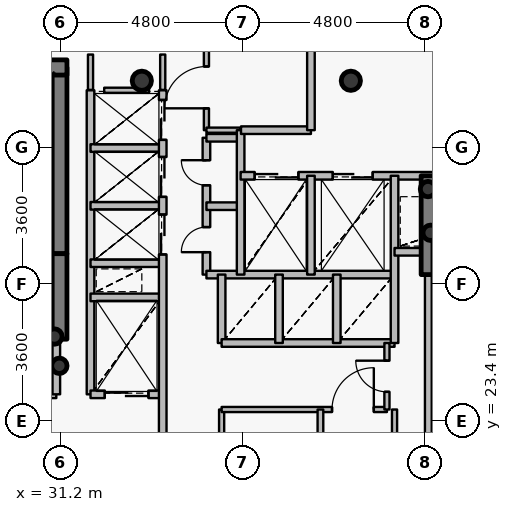
"""IFC4 building model, lengths in metres.
Left out: names, types, materials, properties, quantities, classifications, styles, units other than length and angle.
Written with IfcOpenShell. Run it as: python <this file> out.ifc"""

import sys

from ifc_helpers import new_model, si_unit, direction, frame, frame_2d, origin, origin_2d, place, context, subcontext, project, spatial, rectangle, hollow_circle, extrude, source, transform, mapped, element, fill, save


model = new_model("IFC4")
c1 = context("Model", 3, precision=1e-05, world=origin(), true_north=direction((0.0, 1.0)))
c2 = subcontext(c1, "Body", "Model", "MODEL_VIEW")
j1 = project(units=[si_unit("LENGTHUNIT", "METRE"), si_unit("PLANEANGLEUNIT", "RADIAN")], contexts=[c1])
p1 = place(None, origin())
s1 = spatial("IfcSite", under=j1, at=p1, CompositionType="ELEMENT")
p2 = place(p1, origin())
s2 = spatial("IfcBuilding", under=s1, at=p2, CompositionType="ELEMENT")
p3 = place(p2, frame((0.0, 0.0, 259.05)))
s3 = spatial("IfcBuildingStorey", under=s2, at=p3, CompositionType="ELEMENT", Elevation=259.05)
for number, where, z_axis, x_axis in (
    (1, (38.85, 32.35, 0.0), (0.0, 0.0, 1.0), (1.0, 0.0, 0.0)),
    (2, (33.35, 32.35, 0.0), (0.0, 0.0, 1.0), (1.0, 0.0, 0.0)),
):
    element("IfcColumn", number, at=place(p3, frame(where, z_axis=z_axis, x_axis=x_axis)), inside=s3, PredefinedType="COLUMN", context=c2, shape_type="SweptSolid", body=[
        extrude(hollow_circle(Radius=0.254, WallThickness=0.02, at=origin_2d()), origin(), (0.0, 0.0, 1.0), 3.75),
    ])
p4 = place(p3, frame((31.18, 27.8, 0.0), z_axis=(0.0, 0.0, 1.0), x_axis=(0.0, 1.0, 0.0)))
e3 = element("IfcWall", 3, at=p4, inside=s3, PredefinedType="SHEAR", context=c2, shape_type="SweptSolid", body=[
    extrude(rectangle(XDim=4.9, YDim=0.4, at=frame_2d((2.45, 0.0))), origin(), (0.0, 0.0, 1.0), 3.75),
])
p5 = place(p3, frame((27.28, 32.7, 0.0), z_axis=(0.0, 0.0, 1.0), x_axis=(1.0, 0.0, 0.0)))
e4 = element("IfcWall", 4, at=p5, inside=s3, PredefinedType="SHEAR", context=c2, shape_type="SweptSolid", body=[
    extrude(rectangle(XDim=4.1, YDim=0.4, at=frame_2d((2.05, 0.0))), origin(), (0.0, 0.0, 1.0), 3.75),
])
for number, where, z_axis, x_axis in (
    (5, (31.05, 25.62, 0.0), (0.0, 0.0, 1.0), (1.0, 0.0, 0.0)),
    (6, (31.18, 24.85, 0.0), (0.0, 0.0, 1.0), (1.0, 0.0, 0.0)),
    (7, (40.95, 28.35, 0.0), (0.0, 0.0, 1.0), (1.0, 0.0, 0.0)),
    (8, (40.88, 29.5, 0.0), (0.0, 0.0, 1.0), (1.0, 0.0, 0.0)),
):
    element("IfcColumn", number, at=place(p3, frame(where, z_axis=z_axis, x_axis=x_axis)), inside=s3, PredefinedType="COLUMN", context=c2, shape_type="SweptSolid", body=[
        extrude(hollow_circle(Radius=0.203, WallThickness=0.016, at=origin_2d()), origin(), (0.0, 0.0, 1.0), 3.75),
    ])
p6 = place(p3, frame((31.18, 25.55, 0.0), z_axis=(0.0, 0.0, 1.0), x_axis=(0.0, 1.0, 0.0)))
e9 = element("IfcWall", 9, at=p6, inside=s3, PredefinedType="SHEAR", context=c2, shape_type="SweptSolid", body=[
    extrude(rectangle(XDim=2.25, YDim=0.4, at=frame_2d((1.125, 0.0))), origin(), (0.0, 0.0, 1.0), 3.05),
])
p7 = place(p3, frame((40.9, 27.25, 0.0), z_axis=(0.0, 0.0, 1.0), x_axis=(0.0, 1.0, 0.0)))
e10 = element("IfcWall", 10, at=p7, inside=s3, PredefinedType="SHEAR", context=c2, shape_type="SweptSolid", body=[
    extrude(rectangle(XDim=2.6, YDim=0.4, at=frame_2d((1.3, 0.0))), origin(), (0.0, 0.0, 1.0), 3.05),
])
p8 = place(p3, frame((27.56, 24.1, 0.0), z_axis=(0.0, 0.0, 1.0), x_axis=(1.0, 0.0, 0.0)))
e11 = element("IfcWall", 11, at=p8, inside=s3, PredefinedType="PARTITIONING", context=c2, shape_type="SweptSolid", body=[
    extrude(rectangle(XDim=3.54, YDim=0.2, at=frame_2d((1.77, 0.0))), origin(), (0.0, 0.0, 1.0), 3.45),
])
p9 = place(p8, frame((1.17, 0.0, 0.0)))
e12 = element("IfcOpeningElement", 12, at=p9, cuts=e11, PredefinedType="OPENING", context=c2, shape_type="SweptSolid", body=[
    extrude(rectangle(XDim=1.2, YDim=2.15, at=origin_2d()), frame((0.6, 0.11, 1.075), z_axis=(0.0, -1.0, 0.0), x_axis=(1.0, 0.0, 0.0)), (0.0, 0.0, 1.0), 0.22),
])
p10 = place(p3, frame((31.1, 24.1, 0.0), z_axis=(0.0, 0.0, 1.0), x_axis=(0.0, 1.0, 0.0)))
e13 = element("IfcWall", 13, at=p10, inside=s3, PredefinedType="PARTITIONING", context=c2, shape_type="SweptSolid", body=[
    extrude(rectangle(XDim=1.44, YDim=0.2, at=frame_2d((0.72, 0.0))), origin(), (0.0, 0.0, 1.0), 3.45),
])
p11 = place(p3, frame((32.0, 24.1, 0.0), z_axis=(0.0, 0.0, 1.0), x_axis=(0.0, 1.0, 0.0)))
e14 = element("IfcWall", 14, at=p11, inside=s3, PredefinedType="PARTITIONING", context=c2, shape_type="SweptSolid", body=[
    extrude(rectangle(XDim=8.0, YDim=0.2, at=frame_2d((4.0, 0.0))), origin(), (0.0, 0.0, 1.0), 3.45),
])
p12 = place(p3, frame((32.0, 24.1, 0.0), z_axis=(0.0, 0.0, 1.0), x_axis=(1.0, 0.0, 0.0)))
e15 = element("IfcWall", 15, at=p12, inside=s3, PredefinedType="PARTITIONING", context=c2, shape_type="SweptSolid", body=[
    extrude(rectangle(XDim=1.9, YDim=0.2, at=frame_2d((0.95, 0.0))), origin(), (0.0, 0.0, 1.0), 3.035),
])
p13 = place(p12, frame((0.375, 0.0, 0.0)))
e16 = element("IfcOpeningElement", 16, at=p13, cuts=e15, PredefinedType="OPENING", context=c2, shape_type="SweptSolid", body=[
    extrude(rectangle(XDim=1.15, YDim=2.15, at=origin_2d()), frame((0.575, 0.11, 1.075), z_axis=(0.0, -1.0, 0.0), x_axis=(1.0, 0.0, 0.0)), (0.0, 0.0, 1.0), 0.22),
])
for number, where, z_axis, x_axis in (
    (17, (32.0, 26.65, 0.0), (0.0, 0.0, 1.0), (1.0, 0.0, 0.0)),
    (18, (32.0, 27.55, 0.0), (0.0, 0.0, 1.0), (1.0, 0.0, 0.0)),
    (19, (32.0, 29.06, 0.0), (0.0, 0.0, 1.0), (1.0, 0.0, 0.0)),
    (20, (32.0, 30.58, 0.0), (0.0, 0.0, 1.0), (1.0, 0.0, 0.0)),
):
    element("IfcWall", number, at=place(p3, frame(where, z_axis=z_axis, x_axis=x_axis)), inside=s3, PredefinedType="PARTITIONING", context=c2, shape_type="SweptSolid", body=[
        extrude(rectangle(XDim=1.9, YDim=0.2, at=frame_2d((0.95, 0.0))), origin(), (0.0, 0.0, 1.0), 3.035),
    ])
p14 = place(p3, frame((33.9, 20.7, 0.0), z_axis=(0.0, 0.0, 1.0), x_axis=(0.0, 1.0, 0.0)))
e21 = element("IfcWall", 21, at=p14, inside=s3, PredefinedType="PARTITIONING", context=c2, shape_type="SweptSolid", body=[
    extrude(rectangle(XDim=11.4, YDim=0.2, at=frame_2d((5.7, 0.0))), origin(), (0.0, 0.0, 1.0), 3.035),
])
p15 = place(p14, frame((7.08, 0.0, 0.0)))
e22 = element("IfcOpeningElement", 22, at=p15, cuts=e21, PredefinedType="OPENING", context=c2, shape_type="SweptSolid", body=[
    extrude(rectangle(XDim=1.05, YDim=2.15, at=origin_2d()), frame((0.525, 0.11, 1.075), z_axis=(0.0, -1.0, 0.0), x_axis=(1.0, 0.0, 0.0)), (0.0, 0.0, 1.0), 0.22),
])
p16 = place(p14, frame((8.595, 0.0, 0.0)))
e23 = element("IfcOpeningElement", 23, at=p16, cuts=e21, PredefinedType="OPENING", context=c2, shape_type="SweptSolid", body=[
    extrude(rectangle(XDim=1.05, YDim=2.15, at=origin_2d()), frame((0.525, 0.11, 1.075), z_axis=(0.0, -1.0, 0.0), x_axis=(1.0, 0.0, 0.0)), (0.0, 0.0, 1.0), 0.22),
])
p17 = place(p14, frame((10.095, 0.0, 0.0)))
e24 = element("IfcOpeningElement", 24, at=p17, cuts=e21, PredefinedType="OPENING", context=c2, shape_type="SweptSolid", body=[
    extrude(rectangle(XDim=1.05, YDim=2.15, at=origin_2d()), frame((0.525, 0.11, 1.075), z_axis=(0.0, -1.0, 0.0), x_axis=(1.0, 0.0, 0.0)), (0.0, 0.0, 1.0), 0.22),
])
p18 = place(p3, frame((35.05, 27.25, 0.0), z_axis=(0.0, 0.0, 1.0), x_axis=(0.0, 1.0, 0.0)))
e25 = element("IfcWall", 25, at=p18, inside=s3, PredefinedType="PARTITIONING", context=c2, shape_type="SweptSolid", body=[
    extrude(rectangle(XDim=3.6, YDim=0.2, at=frame_2d((1.8, 0.0))), origin(), (0.0, 0.0, 1.0), 3.45),
])
p19 = place(p18, frame((0.59, 0.0, 0.0)))
e26 = element("IfcOpeningElement", 26, at=p19, cuts=e25, PredefinedType="OPENING", context=c2, shape_type="SweptSolid", body=[
    extrude(rectangle(XDim=0.66, YDim=2.05, at=origin_2d()), frame((0.33, 0.11, 1.025), z_axis=(0.0, -1.0, 0.0), x_axis=(1.0, 0.0, 0.0)), (0.0, 0.0, 1.0), 0.22),
])
p20 = place(p18, frame((2.35, 0.0, 0.0)))
e27 = element("IfcOpeningElement", 27, at=p20, cuts=e25, PredefinedType="OPENING", context=c2, shape_type="SweptSolid", body=[
    extrude(rectangle(XDim=0.66, YDim=2.05, at=origin_2d()), frame((0.33, 0.11, 1.025), z_axis=(0.0, -1.0, 0.0), x_axis=(1.0, 0.0, 0.0)), (0.0, 0.0, 1.0), 0.22),
])
p21 = place(p3, frame((35.05, 27.25, 0.0), z_axis=(0.0, 0.0, 1.0), x_axis=(1.0, 0.0, 0.0)))
e28 = element("IfcWall", 28, at=p21, inside=s3, PredefinedType="PARTITIONING", context=c2, shape_type="SweptSolid", body=[
    extrude(rectangle(XDim=4.95, YDim=0.2, at=frame_2d((2.475, 0.0))), origin(), (0.0, 0.0, 1.0), 3.035),
])
for number, where, z_axis, x_axis in (
    (29, (35.05, 29.05, 0.0), (0.0, 0.0, 1.0), (1.0, 0.0, 0.0)),
    (30, (35.05, 30.85, 0.0), (0.0, 0.0, 1.0), (1.0, 0.0, 0.0)),
):
    element("IfcWall", number, at=place(p3, frame(where, z_axis=z_axis, x_axis=x_axis)), inside=s3, PredefinedType="PARTITIONING", context=c2, shape_type="SweptSolid", body=[
        extrude(rectangle(XDim=0.9, YDim=0.2, at=frame_2d((0.45, 0.0))), origin(), (0.0, 0.0, 1.0), 3.45),
    ])
p22 = place(p3, frame((35.05, 31.05, 0.0), z_axis=(0.0, 0.0, 1.0), x_axis=(0.0, 1.0, 0.0)))
e31 = element("IfcWall", 31, at=p22, inside=s3, PredefinedType="PARTITIONING", context=c2, shape_type="SweptSolid", body=[
    extrude(rectangle(XDim=2.25, YDim=0.135, at=frame_2d((1.125, 0.0))), origin(), (0.0, 0.0, 1.0), 3.035),
])
p23 = place(p22, frame((0.575, 0.0, 0.0)))
e32 = element("IfcOpeningElement", 32, at=p23, cuts=e31, PredefinedType="OPENING", context=c2, shape_type="SweptSolid", body=[
    extrude(rectangle(XDim=1.1, YDim=2.15, at=origin_2d()), frame((0.55, 0.078, 1.075), z_axis=(0.0, -1.0, 0.0), x_axis=(1.0, 0.0, 0.0)), (0.0, 0.0, 1.0), 0.155),
])
p24 = place(p3, frame((35.05, 31.05, 0.0), z_axis=(0.0, 0.0, 1.0), x_axis=(1.0, 0.0, 0.0)))
e33 = element("IfcWall", 33, at=p24, inside=s3, PredefinedType="PARTITIONING", context=c2, shape_type="SweptSolid", body=[
    extrude(rectangle(XDim=0.9, YDim=0.135, at=frame_2d((0.45, 0.0))), origin(), (0.0, 0.0, 1.0), 3.45),
])
p25 = place(p3, frame((35.45, 20.7, 0.0), z_axis=(0.0, 0.0, 1.0), x_axis=(0.0, 1.0, 0.0)))
e34 = element("IfcWall", 34, at=p25, inside=s3, PredefinedType="PARTITIONING", context=c2, shape_type="SweptSolid", body=[
    extrude(rectangle(XDim=3.0, YDim=0.135, at=frame_2d((1.5, 0.0))), origin(), (0.0, 0.0, 1.0), 3.035),
])
p26 = place(p25, frame((0.95, 0.0, 0.0)))
e35 = element("IfcOpeningElement", 35, at=p26, cuts=e34, PredefinedType="OPENING", context=c2, shape_type="SweptSolid", body=[
    extrude(rectangle(XDim=1.1, YDim=2.15, at=origin_2d()), frame((0.55, 0.078, 1.075), z_axis=(0.0, -1.0, 0.0), x_axis=(1.0, 0.0, 0.0)), (0.0, 0.0, 1.0), 0.155),
])
p27 = place(p3, frame((35.45, 23.7, 0.0), z_axis=(0.0, 0.0, 1.0), x_axis=(1.0, 0.0, 0.0)))
e36 = element("IfcWall", 36, at=p27, inside=s3, PredefinedType="PARTITIONING", context=c2, shape_type="SweptSolid", body=[
    extrude(rectangle(XDim=4.35, YDim=0.135, at=frame_2d((2.175, 0.0))), origin(), (0.0, 0.0, 1.0), 3.035),
])
p28 = place(p27, frame((2.905, 0.0, 0.0)))
e37 = element("IfcOpeningElement", 37, at=p28, cuts=e36, PredefinedType="OPENING", context=c2, shape_type="SweptSolid", body=[
    extrude(rectangle(XDim=1.1, YDim=2.15, at=origin_2d()), frame((0.55, 0.078, 1.075), z_axis=(0.0, -1.0, 0.0), x_axis=(1.0, 0.0, 0.0)), (0.0, 0.0, 1.0), 0.155),
])
p29 = place(p3, frame((35.45, 25.45, 0.0), z_axis=(0.0, 0.0, 1.0), x_axis=(0.0, 1.0, 0.0)))
e38 = element("IfcWall", 38, at=p29, inside=s3, PredefinedType="PARTITIONING", context=c2, shape_type="SweptSolid", body=[
    extrude(rectangle(XDim=1.8, YDim=0.2, at=frame_2d((0.9, 0.0))), origin(), (0.0, 0.0, 1.0), 3.45),
])
p30 = place(p3, frame((35.45, 25.45, 0.0), z_axis=(0.0, 0.0, 1.0), x_axis=(1.0, 0.0, 0.0)))
e39 = element("IfcWall", 39, at=p30, inside=s3, PredefinedType="PARTITIONING", context=c2, shape_type="SweptSolid", body=[
    extrude(rectangle(XDim=4.55, YDim=0.2, at=frame_2d((2.275, 0.0))), origin(), (0.0, 0.0, 1.0), 3.035),
])
p31 = place(p3, frame((35.95, 27.25, 0.0), z_axis=(0.0, 0.0, 1.0), x_axis=(0.0, 1.0, 0.0)))
e40 = element("IfcWall", 40, at=p31, inside=s3, PredefinedType="PARTITIONING", context=c2, shape_type="SweptSolid", body=[
    extrude(rectangle(XDim=3.8, YDim=0.2, at=frame_2d((1.9, 0.0))), origin(), (0.0, 0.0, 1.0), 3.45),
])
p32 = place(p3, frame((35.95, 29.85, 0.0), z_axis=(0.0, 0.0, 1.0), x_axis=(1.0, 0.0, 0.0)))
e41 = element("IfcWall", 41, at=p32, inside=s3, PredefinedType="PARTITIONING", context=c2, shape_type="SweptSolid", body=[
    extrude(rectangle(XDim=8.49, YDim=0.2, at=frame_2d((4.245, 0.0))), origin(), (0.0, 0.0, 1.0), 3.035),
])
p33 = place(p32, frame((6.1, 0.0, 0.0)))
e42 = element("IfcOpeningElement", 42, at=p33, cuts=e41, PredefinedType="OPENING", context=c2, shape_type="SweptSolid", body=[
    extrude(rectangle(XDim=1.2, YDim=2.15, at=origin_2d()), frame((0.6, 0.11, 1.075), z_axis=(0.0, -1.0, 0.0), x_axis=(1.0, 0.0, 0.0)), (0.0, 0.0, 1.0), 0.22),
])
p34 = place(p32, frame((0.37, 0.0, 0.0)))
e43 = element("IfcOpeningElement", 43, at=p34, cuts=e41, PredefinedType="OPENING", context=c2, shape_type="SweptSolid", body=[
    extrude(rectangle(XDim=1.15, YDim=2.15, at=origin_2d()), frame((0.575, 0.11, 1.075), z_axis=(0.0, -1.0, 0.0), x_axis=(1.0, 0.0, 0.0)), (0.0, 0.0, 1.0), 0.22),
])
p35 = place(p32, frame((2.425, 0.0, 0.0)))
e44 = element("IfcOpeningElement", 44, at=p35, cuts=e41, PredefinedType="OPENING", context=c2, shape_type="SweptSolid", body=[
    extrude(rectangle(XDim=1.05, YDim=2.15, at=origin_2d()), frame((0.525, 0.11, 1.075), z_axis=(0.0, -1.0, 0.0), x_axis=(1.0, 0.0, 0.0)), (0.0, 0.0, 1.0), 0.22),
])
p36 = place(p3, frame((35.96, 31.05, 0.0), z_axis=(0.0, 0.0, 1.0), x_axis=(1.0, 0.0, 0.0)))
e45 = element("IfcWall", 45, at=p36, inside=s3, PredefinedType="PARTITIONING", context=c2, shape_type="SweptSolid", body=[
    extrude(rectangle(XDim=1.84, YDim=0.2, at=frame_2d((0.92, 0.0))), origin(), (0.0, 0.0, 1.0), 3.45),
])
p37 = place(p3, frame((36.96, 25.45, 0.0), z_axis=(0.0, 0.0, 1.0), x_axis=(0.0, 1.0, 0.0)))
e46 = element("IfcWall", 46, at=p37, inside=s3, PredefinedType="PARTITIONING", context=c2, shape_type="SweptSolid", body=[
    extrude(rectangle(XDim=1.8, YDim=0.2, at=frame_2d((0.9, 0.0))), origin(), (0.0, 0.0, 1.0), 3.45),
])
p38 = place(p3, frame((37.8, 27.25, 0.0), z_axis=(0.0, 0.0, 1.0), x_axis=(0.0, 1.0, 0.0)))
e47 = element("IfcWall", 47, at=p38, inside=s3, PredefinedType="PARTITIONING", context=c2, shape_type="SweptSolid", body=[
    extrude(rectangle(XDim=2.6, YDim=0.2, at=frame_2d((1.3, 0.0))), origin(), (0.0, 0.0, 1.0), 3.45),
])
p39 = place(p3, frame((37.8, 31.05, 0.0), z_axis=(0.0, 0.0, 1.0), x_axis=(0.0, 1.0, 0.0)))
e48 = element("IfcWall", 48, at=p39, inside=s3, PredefinedType="PARTITIONING", context=c2, shape_type="SweptSolid", body=[
    extrude(rectangle(XDim=2.25, YDim=0.2, at=frame_2d((1.125, 0.0))), origin(), (0.0, 0.0, 1.0), 3.035),
])
p40 = place(p3, frame((38.05, 20.18, 0.0), z_axis=(0.0, 0.0, 1.0), x_axis=(0.0, 1.0, 0.0)))
e49 = element("IfcWall", 49, at=p40, inside=s3, PredefinedType="PARTITIONING", context=c2, shape_type="SweptSolid", body=[
    extrude(rectangle(XDim=3.52, YDim=0.15, at=frame_2d((1.76, 0.0))), origin(), (0.0, 0.0, 1.0), 2.985),
])
p41 = place(p3, frame((38.48, 25.45, 0.0), z_axis=(0.0, 0.0, 1.0), x_axis=(0.0, 1.0, 0.0)))
e50 = element("IfcWall", 50, at=p41, inside=s3, PredefinedType="PARTITIONING", context=c2, shape_type="SweptSolid", body=[
    extrude(rectangle(XDim=1.8, YDim=0.2, at=frame_2d((0.9, 0.0))), origin(), (0.0, 0.0, 1.0), 3.45),
])
p42 = place(p3, frame((39.8, 23.7, 0.0), z_axis=(0.0, 0.0, 1.0), x_axis=(0.0, 1.0, 0.0)))
e51 = element("IfcWall", 51, at=p42, inside=s3, PredefinedType="PARTITIONING", context=c2, shape_type="SweptSolid", body=[
    extrude(rectangle(XDim=1.75, YDim=0.135, at=frame_2d((0.875, 0.0))), origin(), (0.0, 0.0, 1.0), 3.45),
])
p43 = place(p42, frame((0.465, 0.0, 0.0)))
e52 = element("IfcOpeningElement", 52, at=p43, cuts=e51, PredefinedType="OPENING", context=c2, shape_type="SweptSolid", body=[
    extrude(rectangle(XDim=0.82, YDim=2.1, at=origin_2d()), frame((0.41, 0.078, 1.05), z_axis=(0.0, -1.0, 0.0), x_axis=(1.0, 0.0, 0.0)), (0.0, 0.0, 1.0), 0.155),
])
p44 = place(p3, frame((40.0, 25.45, 0.0), z_axis=(0.0, 0.0, 1.0), x_axis=(0.0, 1.0, 0.0)))
e53 = element("IfcWall", 53, at=p44, inside=s3, PredefinedType="PARTITIONING", context=c2, shape_type="SweptSolid", body=[
    extrude(rectangle(XDim=4.4, YDim=0.2, at=frame_2d((2.2, 0.0))), origin(), (0.0, 0.0, 1.0), 3.45),
])
p45 = place(p3, frame((40.0, 27.85, 0.0), z_axis=(0.0, 0.0, 1.0), x_axis=(1.0, 0.0, 0.0)))
e54 = element("IfcWall", 54, at=p45, inside=s3, PredefinedType="PARTITIONING", context=c2, shape_type="SweptSolid", body=[
    extrude(rectangle(XDim=0.9, YDim=0.2, at=frame_2d((0.45, 0.0))), origin(), (0.0, 0.0, 1.0), 3.45),
])
p46 = place(p3, frame((40.9, 21.33, 0.0), z_axis=(0.0, 0.0, 1.0), x_axis=(0.0, 1.0, 0.0)))
e55 = element("IfcWall", 55, at=p46, inside=s3, PredefinedType="PARTITIONING", context=c2, shape_type="SweptSolid", body=[
    extrude(rectangle(XDim=5.91, YDim=0.2, at=frame_2d((2.955, 0.0))), origin(), (0.0, 0.0, 1.0), 2.985),
])
p47 = place(p3, frame((32.36, 32.1, 0.0), z_axis=(0.0, 0.0, 1.0), x_axis=(1.0, 0.0, 0.0)))
e56 = element("IfcWall", 56, at=p47, inside=s3, PredefinedType="PARTITIONING", context=c2, shape_type="SweptSolid", body=[
    extrude(rectangle(XDim=1.18, YDim=0.135, at=frame_2d((0.59, 0.0))), origin(), (0.0, 0.0, 1.0), 3.035),
])
p48 = place(p3, frame((40.0, 23.7, 0.0), z_axis=(0.0, 0.0, 1.0), x_axis=(0.0, -1.0, 0.0)))
e57 = element("IfcWall", 57, at=p48, inside=s3, PredefinedType="PARTITIONING", context=c2, shape_type="SweptSolid", body=[
    extrude(rectangle(XDim=2.74, YDim=0.135, at=frame_2d((1.37, 0.0))), origin(), (0.0, 0.0, 1.0), 2.985),
])
p49 = place(p3, frame((32.0, 33.04, 0.0), z_axis=(0.0, 0.0, 1.0), x_axis=(0.0, -1.0, 0.0)))
e58 = element("IfcWall", 58, at=p49, inside=s3, PredefinedType="PARTITIONING", context=c2, shape_type="SweptSolid", body=[
    extrude(rectangle(XDim=0.93, YDim=0.135, at=frame_2d((0.465, 0.0))), origin(), (0.0, 0.0, 1.0), 2.985),
])
p50 = place(p3, frame((33.9, 32.11, 0.0), z_axis=(0.0, 0.0, 1.0), x_axis=(0.0, 1.0, 0.0)))
e59 = element("IfcWall", 59, at=p50, inside=s3, PredefinedType="PARTITIONING", context=c2, shape_type="SweptSolid", body=[
    extrude(rectangle(XDim=0.93, YDim=0.135, at=frame_2d((0.465, 0.0))), origin(), (0.0, 0.0, 1.0), 3.035),
])
m1 = source(origin(), c2, "Body", "SweptSolid", [
    extrude(rectangle(XDim=1.15, YDim=2.15, at=origin_2d()), frame((0.575, 0.025, 1.075), z_axis=(0.0, -1.0, 0.0), x_axis=(1.0, 0.0, 0.0)), (0.0, 0.0, 1.0), 0.05),
])
p51 = place(p34, origin())
e60 = element("IfcDoor", 60, at=p51, inside=s3, OperationType="DOUBLE_DOOR_SLIDING", PredefinedType="USERDEFINED", context=c2, shape_type="MappedRepresentation", body=[
    mapped(m1, transform((0.0, 0.0, 0.0), x_axis=(1.0, 0.0, 0.0), y_axis=(0.0, 1.0, 0.0), z_axis=(0.0, 0.0, 1.0), scale=1.0)),
])
fill(e43, e60)
p52 = place(p13, origin())
e61 = element("IfcDoor", 61, at=p52, inside=s3, OperationType="DOUBLE_DOOR_SLIDING", PredefinedType="USERDEFINED", context=c2, shape_type="MappedRepresentation", body=[
    mapped(m1, transform((0.0, 0.0, 0.0), x_axis=(1.0, 0.0, 0.0), y_axis=(0.0, 1.0, 0.0), z_axis=(0.0, 0.0, 1.0), scale=1.0)),
])
fill(e16, e61)
m2 = source(origin(), c2, "Body", "SweptSolid", [
    extrude(rectangle(XDim=1.05, YDim=2.15, at=origin_2d()), frame((0.525, 0.025, 1.075), z_axis=(0.0, -1.0, 0.0), x_axis=(1.0, 0.0, 0.0)), (0.0, 0.0, 1.0), 0.05),
])
p53 = place(p35, origin())
e62 = element("IfcDoor", 62, at=p53, inside=s3, OperationType="DOUBLE_DOOR_SLIDING", PredefinedType="USERDEFINED", context=c2, shape_type="MappedRepresentation", body=[
    mapped(m2, transform((0.0, 0.0, 0.0), x_axis=(1.0, 0.0, 0.0), y_axis=(0.0, 1.0, 0.0), z_axis=(0.0, 0.0, 1.0), scale=1.0)),
])
fill(e44, e62)
p54 = place(p15, origin())
e63 = element("IfcDoor", 63, at=p54, inside=s3, OperationType="DOUBLE_DOOR_SLIDING", PredefinedType="USERDEFINED", context=c2, shape_type="MappedRepresentation", body=[
    mapped(m2, transform((0.0, 0.0, 0.0), x_axis=(1.0, 0.0, 0.0), y_axis=(0.0, 1.0, 0.0), z_axis=(0.0, 0.0, 1.0), scale=1.0)),
])
fill(e22, e63)
p55 = place(p16, origin())
e64 = element("IfcDoor", 64, at=p55, inside=s3, OperationType="DOUBLE_DOOR_SLIDING", PredefinedType="USERDEFINED", context=c2, shape_type="MappedRepresentation", body=[
    mapped(m2, transform((0.0, 0.0, 0.0), x_axis=(1.0, 0.0, 0.0), y_axis=(0.0, 1.0, 0.0), z_axis=(0.0, 0.0, 1.0), scale=1.0)),
])
fill(e23, e64)
p56 = place(p17, origin())
e65 = element("IfcDoor", 65, at=p56, inside=s3, OperationType="DOUBLE_DOOR_SLIDING", PredefinedType="USERDEFINED", context=c2, shape_type="MappedRepresentation", body=[
    mapped(m2, transform((0.0, 0.0, 0.0), x_axis=(1.0, 0.0, 0.0), y_axis=(0.0, 1.0, 0.0), z_axis=(0.0, 0.0, 1.0), scale=1.0)),
])
fill(e24, e65)
m3 = source(origin(), c2, "Body", "SweptSolid", [
    extrude(rectangle(XDim=0.66, YDim=2.05, at=origin_2d()), frame((0.33, 0.025, 1.025), z_axis=(0.0, -1.0, 0.0), x_axis=(1.0, 0.0, 0.0)), (0.0, 0.0, 1.0), 0.05),
])
p57 = place(p19, origin())
e66 = element("IfcDoor", 66, at=p57, inside=s3, OperationType="SINGLE_SWING_LEFT", PredefinedType="USERDEFINED", context=c2, shape_type="MappedRepresentation", body=[
    mapped(m3, transform((0.0, 0.0, 0.0), x_axis=(1.0, 0.0, 0.0), y_axis=(0.0, 1.0, 0.0), z_axis=(0.0, 0.0, 1.0), scale=1.0)),
])
fill(e26, e66)
p58 = place(p20, origin())
e67 = element("IfcDoor", 67, at=p58, inside=s3, OperationType="SINGLE_SWING_RIGHT", PredefinedType="USERDEFINED", context=c2, shape_type="MappedRepresentation", body=[
    mapped(m3, transform((0.0, 0.0, 0.0), x_axis=(1.0, 0.0, 0.0), y_axis=(0.0, 1.0, 0.0), z_axis=(0.0, 0.0, 1.0), scale=1.0)),
])
fill(e27, e67)
m4 = source(origin(), c2, "Body", "SweptSolid", [
    extrude(rectangle(XDim=1.1, YDim=2.15, at=origin_2d()), frame((0.55, 0.025, 1.075), z_axis=(0.0, -1.0, 0.0), x_axis=(1.0, 0.0, 0.0)), (0.0, 0.0, 1.0), 0.05),
])
p59 = place(p28, origin())
e68 = element("IfcDoor", 68, at=p59, inside=s3, OperationType="SINGLE_SWING_RIGHT", PredefinedType="DOOR", context=c2, shape_type="MappedRepresentation", body=[
    mapped(m4, transform((0.0, 0.0, 0.0), x_axis=(1.0, 0.0, 0.0), y_axis=(0.0, 1.0, 0.0), z_axis=(0.0, 0.0, 1.0), scale=1.0)),
])
fill(e37, e68)
p60 = place(p23, origin())
e69 = element("IfcDoor", 69, at=p60, inside=s3, OperationType="SINGLE_SWING_LEFT", PredefinedType="DOOR", context=c2, shape_type="MappedRepresentation", body=[
    mapped(m4, transform((0.0, 0.0, 0.0), x_axis=(1.0, 0.0, 0.0), y_axis=(0.0, 1.0, 0.0), z_axis=(0.0, 0.0, 1.0), scale=1.0)),
])
fill(e32, e69)
m5 = source(origin(), c2, "Body", "SweptSolid", [
    extrude(rectangle(XDim=0.82, YDim=2.1, at=origin_2d()), frame((0.41, 0.025, 1.05), z_axis=(0.0, -1.0, 0.0), x_axis=(1.0, 0.0, 0.0)), (0.0, 0.0, 1.0), 0.05),
])
p61 = place(p43, origin())
e70 = element("IfcDoor", 70, at=p61, inside=s3, OperationType="SINGLE_SWING_RIGHT", PredefinedType="DOOR", context=c2, shape_type="MappedRepresentation", body=[
    mapped(m5, transform((0.0, 0.0, 0.0), x_axis=(1.0, 0.0, 0.0), y_axis=(0.0, 1.0, 0.0), z_axis=(0.0, 0.0, 1.0), scale=1.0)),
])
fill(e52, e70)
save(model, sys.argv[1])
